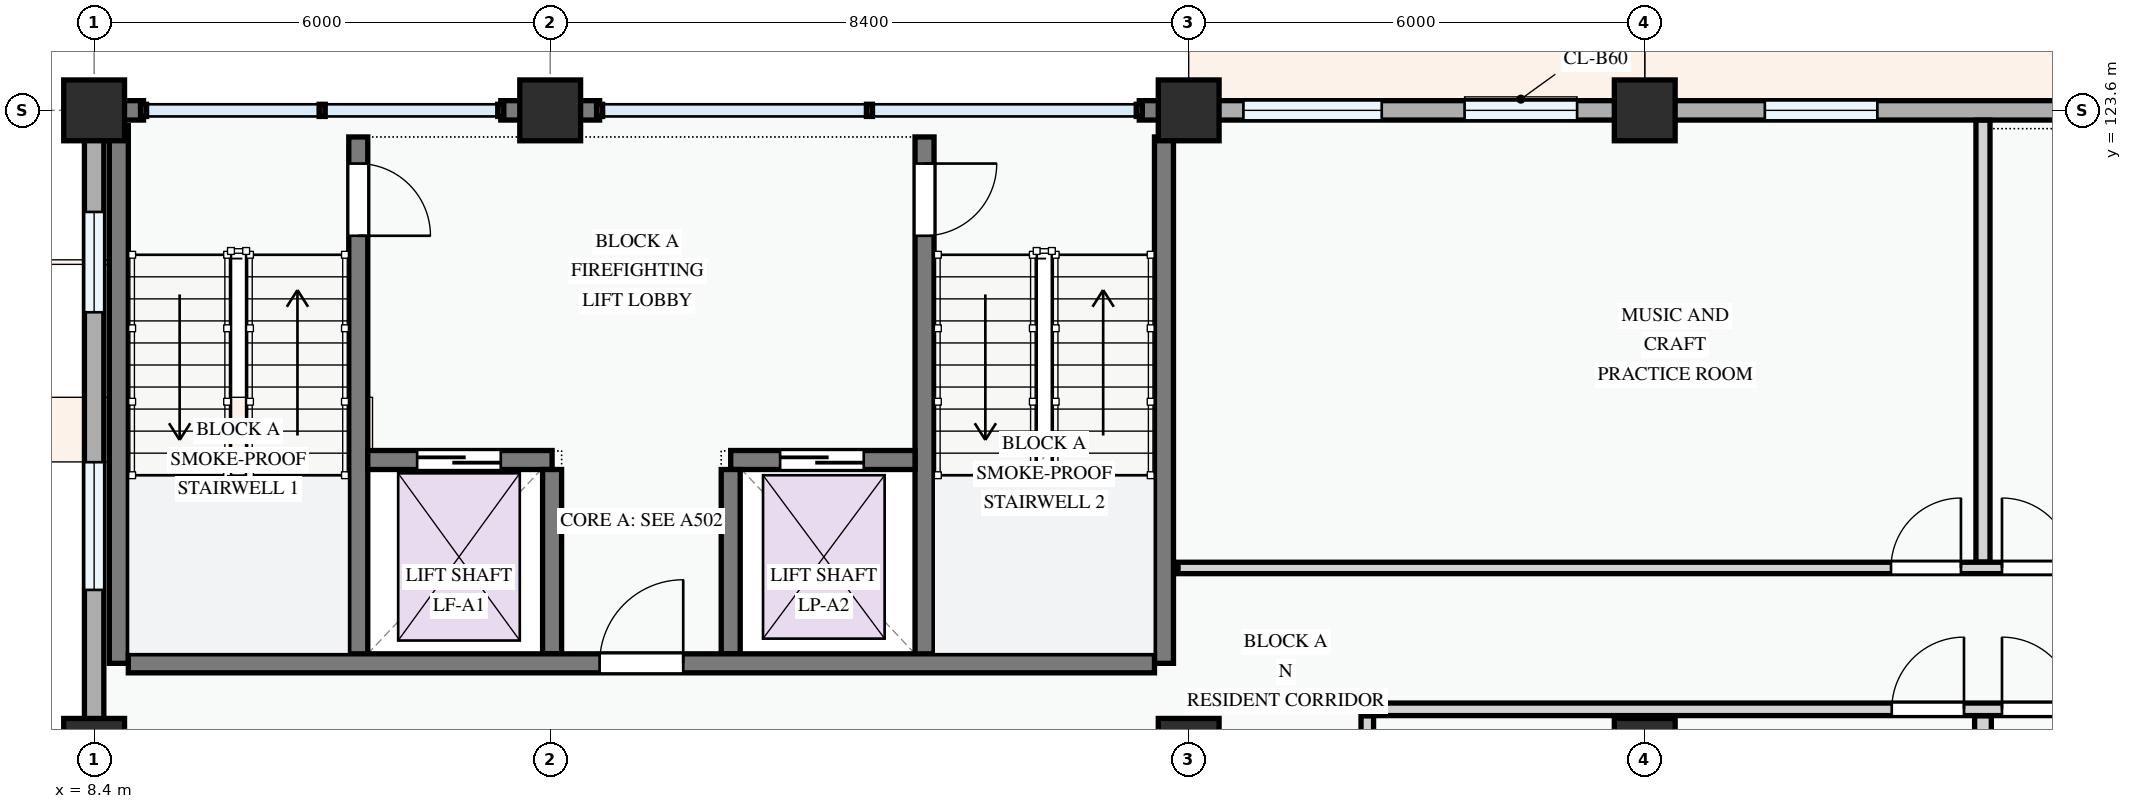
"""IFC4 building model, lengths in metres.
Left out: names, types, materials, properties, quantities, classifications, styles, units other than length and angle.
Written with IfcOpenShell. Run it as: python <this file> out.ifc"""

import sys

from ifc_helpers import new_model, si_unit, direction, frame, frame_2d, origin, origin_2d, place, context, subcontext, project, spatial, rectangle, extrude, element, fill, save


model = new_model("IFC4")
c1 = context("Model", 3, precision=1e-05, world=origin(), true_north=direction((0.0, 1.0)))
c2 = subcontext(c1, "Body", "Model", "MODEL_VIEW")
j1 = project(units=[si_unit("LENGTHUNIT", "METRE"), si_unit("PLANEANGLEUNIT", "RADIAN")], contexts=[c1])
p1 = place(None, origin())
s1 = spatial("IfcSite", under=j1, at=p1, CompositionType="ELEMENT")
p2 = place(p1, origin())
s2 = spatial("IfcBuilding", under=s1, at=p2, CompositionType="ELEMENT")
p3 = place(p2, frame((0.0, 0.0, 4.5)))
s3 = spatial("IfcBuildingStorey", under=s2, at=p3, CompositionType="ELEMENT", Elevation=4.5)
for number, where, z_axis, x_axis in (
    (1, (8.4, 115.2, 0.0), (0.0, 0.0, 1.0), (1.0, 0.0, 0.0)),
    (2, (8.4, 123.6, 0.0), (0.0, 0.0, 1.0), (1.0, 0.0, 0.0)),
    (3, (14.4, 123.6, 0.0), (0.0, 0.0, 1.0), (1.0, 0.0, 0.0)),
    (4, (22.8, 115.2, 0.0), (0.0, 0.0, 1.0), (1.0, 0.0, 0.0)),
    (5, (22.8, 123.6, 0.0), (0.0, 0.0, 1.0), (1.0, 0.0, 0.0)),
    (6, (28.8, 115.2, 0.0), (0.0, 0.0, 1.0), (1.0, 0.0, 0.0)),
    (7, (28.8, 123.6, 0.0), (0.0, 0.0, 1.0), (1.0, 0.0, 0.0)),
):
    element("IfcColumn", number, at=place(p3, frame(where, z_axis=z_axis, x_axis=x_axis)), inside=s3, PredefinedType="COLUMN", context=c2, shape_type="SweptSolid", body=[
        extrude(rectangle(XDim=0.8, YDim=0.8, at=origin_2d()), origin(), (0.0, 0.0, 1.0), 3.6),
    ])
p4 = place(p3, frame((37.2, 123.6, 0.0), z_axis=(0.0, 0.0, 1.0), x_axis=(-1.0, 0.0, 0.0)))
e8 = element("IfcWall", 8, at=p4, inside=s3, PredefinedType="STANDARD", context=c2, shape_type="SweptSolid", body=[
    extrude(rectangle(XDim=8.4, YDim=0.255, at=frame_2d((4.2, 0.0))), origin(), (0.0, 0.0, 1.0), 2.675),
])
p5 = place(p4, frame((1.445, 0.0, 0.78)))
e9 = element("IfcOpeningElement", 9, at=p5, cuts=e8, PredefinedType="OPENING", context=c2, shape_type="SweptSolid", body=[
    extrude(rectangle(XDim=1.25, YDim=1.3, at=frame_2d((0.625, 0.65))), frame((0.0, 0.137, 0.0), z_axis=(0.0, -1.0, 0.0), x_axis=(1.0, 0.0, 0.0)), (0.0, 0.0, 1.0), 0.275),
])
p6 = place(p4, frame((5.34, 0.0, 0.78)))
e10 = element("IfcOpeningElement", 10, at=p6, cuts=e8, PredefinedType="OPENING", context=c2, shape_type="SweptSolid", body=[
    extrude(rectangle(XDim=1.48, YDim=1.52, at=frame_2d((0.74, 0.76))), frame((0.0, 0.137, 0.0), z_axis=(0.0, -1.0, 0.0), x_axis=(1.0, 0.0, 0.0)), (0.0, 0.0, 1.0), 0.275),
])
p7 = place(p3, frame((28.8, 123.6, 0.0), z_axis=(0.0, 0.0, 1.0), x_axis=(-1.0, 0.0, 0.0)))
e11 = element("IfcWall", 11, at=p7, inside=s3, PredefinedType="STANDARD", context=c2, shape_type="SweptSolid", body=[
    extrude(rectangle(XDim=6.0, YDim=0.255, at=frame_2d((3.0, 0.0))), origin(), (0.0, 0.0, 1.0), 2.775),
])
p8 = place(p7, frame((0.89, 0.0, 0.78)))
e12 = element("IfcOpeningElement", 12, at=p8, cuts=e11, PredefinedType="OPENING", context=c2, shape_type="SweptSolid", body=[
    extrude(rectangle(XDim=1.48, YDim=1.52, at=frame_2d((0.74, 0.76))), frame((0.0, 0.137, 0.0), z_axis=(0.0, -1.0, 0.0), x_axis=(1.0, 0.0, 0.0)), (0.0, 0.0, 1.0), 0.275),
])
p9 = place(p7, frame((3.46, 0.0, 0.78)))
e13 = element("IfcOpeningElement", 13, at=p9, cuts=e11, PredefinedType="OPENING", context=c2, shape_type="SweptSolid", body=[
    extrude(rectangle(XDim=1.82, YDim=1.46, at=frame_2d((0.91, 0.73))), frame((0.0, 0.137, 0.0), z_axis=(0.0, -1.0, 0.0), x_axis=(1.0, 0.0, 0.0)), (0.0, 0.0, 1.0), 0.275),
])
for number, where, z_axis, x_axis in (
    (14, (22.8, 123.6, 0.0), (0.0, 0.0, 1.0), (-1.0, 0.0, 0.0)),
    (15, (15.05, 123.6, 0.0), (0.0, 0.0, 1.0), (-1.0, 0.0, 0.0)),
):
    element("IfcWall", number, at=place(p3, frame(where, z_axis=z_axis, x_axis=x_axis)), inside=s3, PredefinedType="STANDARD", context=c2, shape_type="SweptSolid", body=[
        extrude(rectangle(XDim=0.65, YDim=0.255, at=frame_2d((0.325, 0.0))), origin(), (0.0, 0.0, 1.0), 3.34),
    ])
p10 = place(p3, frame((14.4, 123.6, 0.0), z_axis=(0.0, 0.0, 1.0), x_axis=(-1.0, 0.0, 0.0)))
e16 = element("IfcWall", 16, at=p10, inside=s3, PredefinedType="STANDARD", context=c2, shape_type="SweptSolid", body=[
    extrude(rectangle(XDim=0.65, YDim=0.255, at=frame_2d((0.325, 0.0))), origin(), (0.0, 0.0, 1.0), 3.34),
])
p11 = place(p3, frame((9.05, 123.6, 0.0), z_axis=(0.0, 0.0, 1.0), x_axis=(-1.0, 0.0, 0.0)))
e17 = element("IfcWall", 17, at=p11, inside=s3, PredefinedType="STANDARD", context=c2, shape_type="SweptSolid", body=[
    extrude(rectangle(XDim=0.521, YDim=0.255, at=frame_2d((0.26, 0.0))), origin(), (0.0, 0.0, 1.0), 3.34),
])
p12 = place(p3, frame((8.4, 123.6, 0.0), z_axis=(0.0, 0.0, 1.0), x_axis=(0.0, -1.0, 0.0)))
e18 = element("IfcWall", 18, at=p12, inside=s3, PredefinedType="STANDARD", context=c2, shape_type="SweptSolid", body=[
    extrude(rectangle(XDim=8.4, YDim=0.255, at=frame_2d((4.2, 0.0))), origin(), (0.0, 0.0, 1.0), 2.725),
])
p13 = place(p12, frame((1.336, 0.0, 0.78)))
e19 = element("IfcOpeningElement", 19, at=p13, cuts=e18, PredefinedType="OPENING", context=c2, shape_type="SweptSolid", body=[
    extrude(rectangle(XDim=1.32, YDim=1.35, at=frame_2d((0.66, 0.675))), frame((0.0, 0.137, 0.0), z_axis=(0.0, -1.0, 0.0), x_axis=(1.0, 0.0, 0.0)), (0.0, 0.0, 1.0), 0.275),
])
p14 = place(p12, frame((4.629, 0.0, 0.78)))
e20 = element("IfcOpeningElement", 20, at=p14, cuts=e18, PredefinedType="OPENING", context=c2, shape_type="SweptSolid", body=[
    extrude(rectangle(XDim=1.68, YDim=1.46, at=frame_2d((0.84, 0.73))), frame((0.0, 0.137, 0.0), z_axis=(0.0, -1.0, 0.0), x_axis=(1.0, 0.0, 0.0)), (0.0, 0.0, 1.0), 0.275),
])
p15 = place(p3, frame((11.875, 123.25, 0.0), z_axis=(0.0, 0.0, 1.0), x_axis=(0.0, -1.0, 0.0)))
e21 = element("IfcWall", 21, at=p15, inside=s3, PredefinedType="SHEAR", context=c2, shape_type="SweptSolid", body=[
    extrude(rectangle(XDim=6.925, YDim=0.25, at=frame_2d((3.462, 0.0))), origin(), (0.0, 0.0, 1.0), 3.3),
])
p16 = place(p15, frame((0.35, 0.0, 0.0)))
e22 = element("IfcOpeningElement", 22, at=p16, cuts=e21, PredefinedType="OPENING", context=c2, shape_type="SweptSolid", body=[
    extrude(rectangle(XDim=0.95, YDim=2.1, at=frame_2d((0.475, 1.05))), frame((0.0, 0.135, 0.0), z_axis=(0.0, -1.0, 0.0), x_axis=(1.0, 0.0, 0.0)), (0.0, 0.0, 1.0), 0.27),
])
p17 = place(p3, frame((8.725, 123.4, 0.0), z_axis=(0.0, 0.0, 1.0), x_axis=(0.0, -1.0, 0.0)))
e23 = element("IfcWall", 23, at=p17, inside=s3, PredefinedType="SHEAR", context=c2, shape_type="SweptSolid", body=[
    extrude(rectangle(XDim=7.075, YDim=0.25, at=frame_2d((3.538, 0.0))), origin(), (0.0, 0.0, 1.0), 3.3),
])
p18 = place(p3, frame((22.475, 123.25, 0.0), z_axis=(0.0, 0.0, 1.0), x_axis=(0.0, -1.0, 0.0)))
e24 = element("IfcWall", 24, at=p18, inside=s3, PredefinedType="SHEAR", context=c2, shape_type="SweptSolid", body=[
    extrude(rectangle(XDim=6.925, YDim=0.25, at=frame_2d((3.462, 0.0))), origin(), (0.0, 0.0, 1.0), 3.3),
])
p19 = place(p3, frame((19.325, 123.25, 0.0), z_axis=(0.0, 0.0, 1.0), x_axis=(0.0, -1.0, 0.0)))
e25 = element("IfcWall", 25, at=p19, inside=s3, PredefinedType="SHEAR", context=c2, shape_type="SweptSolid", body=[
    extrude(rectangle(XDim=6.925, YDim=0.25, at=frame_2d((3.462, 0.0))), origin(), (0.0, 0.0, 1.0), 3.3),
])
p20 = place(p19, frame((0.35, 0.0, 0.0)))
e26 = element("IfcOpeningElement", 26, at=p20, cuts=e25, PredefinedType="OPENING", context=c2, shape_type="SweptSolid", body=[
    extrude(rectangle(XDim=0.95, YDim=2.1, at=frame_2d((0.475, 1.05))), frame((0.0, 0.135, 0.0), z_axis=(0.0, -1.0, 0.0), x_axis=(1.0, 0.0, 0.0)), (0.0, 0.0, 1.0), 0.27),
])
p21 = place(p3, frame((12.0, 119.0, 0.0), z_axis=(0.0, 0.0, 1.0), x_axis=(1.0, 0.0, 0.0)))
e27 = element("IfcWall", 27, at=p21, inside=s3, PredefinedType="SHEAR", context=c2, shape_type="SweptSolid", body=[
    extrude(rectangle(XDim=2.425, YDim=0.25, at=frame_2d((1.212, 0.0))), origin(), (0.0, 0.0, 1.0), 3.3),
])
p22 = place(p21, frame((0.65, 0.0, 0.0)))
e28 = element("IfcOpeningElement", 28, at=p22, cuts=e27, PredefinedType="OPENING", context=c2, shape_type="SweptSolid", body=[
    extrude(rectangle(XDim=1.1, YDim=2.15, at=frame_2d((0.55, 1.075))), frame((0.0, 0.135, 0.0), z_axis=(0.0, -1.0, 0.0), x_axis=(1.0, 0.0, 0.0)), (0.0, 0.0, 1.0), 0.27),
])
p23 = place(p3, frame((16.775, 119.0, 0.0), z_axis=(0.0, 0.0, 1.0), x_axis=(1.0, 0.0, 0.0)))
e29 = element("IfcWall", 29, at=p23, inside=s3, PredefinedType="SHEAR", context=c2, shape_type="SweptSolid", body=[
    extrude(rectangle(XDim=2.425, YDim=0.25, at=frame_2d((1.212, 0.0))), origin(), (0.0, 0.0, 1.0), 3.3),
])
p24 = place(p23, frame((0.65, 0.0, 0.0)))
e30 = element("IfcOpeningElement", 30, at=p24, cuts=e29, PredefinedType="OPENING", context=c2, shape_type="SweptSolid", body=[
    extrude(rectangle(XDim=1.1, YDim=2.15, at=frame_2d((0.55, 1.075))), frame((0.0, 0.135, 0.0), z_axis=(0.0, -1.0, 0.0), x_axis=(1.0, 0.0, 0.0)), (0.0, 0.0, 1.0), 0.27),
])
for number, where, z_axis, x_axis in (
    (31, (14.425, 118.875, 0.0), (0.0, 0.0, 1.0), (0.0, -1.0, 0.0)),
    (32, (16.775, 118.875, 0.0), (0.0, 0.0, 1.0), (0.0, -1.0, 0.0)),
):
    element("IfcWall", number, at=place(p3, frame(where, z_axis=z_axis, x_axis=x_axis)), inside=s3, PredefinedType="SHEAR", context=c2, shape_type="SweptSolid", body=[
        extrude(rectangle(XDim=2.425, YDim=0.25, at=frame_2d((1.212, 0.0))), origin(), (0.0, 0.0, 1.0), 3.3),
    ])
p25 = place(p3, frame((8.85, 116.325, 0.0), z_axis=(0.0, 0.0, 1.0), x_axis=(1.0, 0.0, 0.0)))
e33 = element("IfcWall", 33, at=p25, inside=s3, PredefinedType="SHEAR", context=c2, shape_type="SweptSolid", body=[
    extrude(rectangle(XDim=13.5, YDim=0.25, at=frame_2d((6.75, 0.0))), origin(), (0.0, 0.0, 1.0), 3.3),
])
p26 = place(p25, frame((6.2, 0.0, 0.0)))
e34 = element("IfcOpeningElement", 34, at=p26, cuts=e33, PredefinedType="OPENING", context=c2, shape_type="SweptSolid", body=[
    extrude(rectangle(XDim=1.1, YDim=2.15, at=frame_2d((0.55, 1.075))), frame((0.0, 0.135, 0.0), z_axis=(0.0, -1.0, 0.0), x_axis=(1.0, 0.0, 0.0)), (0.0, 0.0, 1.0), 0.27),
])
p27 = place(p3, frame((25.15, 109.33, 0.0), z_axis=(0.0, 0.0, 1.0), x_axis=(0.0, 1.0, 0.0)))
e35 = element("IfcWall", 35, at=p27, inside=s3, PredefinedType="PARTITIONING", context=c2, shape_type="SweptSolid", body=[
    extrude(rectangle(XDim=6.306, YDim=0.165, at=frame_2d((3.153, 0.0))), origin(), (0.0, 0.0, 1.0), 3.3),
])
p28 = place(p3, frame((33.25, 109.26, 0.0), z_axis=(0.0, 0.0, 1.0), x_axis=(0.0, 1.0, 0.0)))
e36 = element("IfcWall", 36, at=p28, inside=s3, PredefinedType="PARTITIONING", context=c2, shape_type="SweptSolid", body=[
    extrude(rectangle(XDim=6.375, YDim=0.22, at=frame_2d((3.188, 0.0))), origin(), (0.0, 0.0, 1.0), 2.885),
])
p29 = place(p3, frame((33.25, 117.657, 0.0), z_axis=(0.0, 0.0, 1.0), x_axis=(0.0, 1.0, 0.0)))
e37 = element("IfcWall", 37, at=p29, inside=s3, PredefinedType="PARTITIONING", context=c2, shape_type="SweptSolid", body=[
    extrude(rectangle(XDim=5.813, YDim=0.185, at=frame_2d((2.907, 0.0))), origin(), (0.0, 0.0, 1.0), 2.885),
])
p30 = place(p3, frame((25.15, 115.72, 0.0), z_axis=(0.0, 0.0, 1.0), x_axis=(1.0, 0.0, 0.0)))
e38 = element("IfcWall", 38, at=p30, inside=s3, PredefinedType="PARTITIONING", context=c2, shape_type="SweptSolid", body=[
    extrude(rectangle(XDim=32.321, YDim=0.165, at=frame_2d((16.16, 0.0))), origin(), (0.0, 0.0, 1.0), 3.3),
])
p31 = place(p30, frame((6.9, 0.0, 0.0)))
e39 = element("IfcOpeningElement", 39, at=p31, cuts=e38, PredefinedType="OPENING", context=c2, shape_type="SweptSolid", body=[
    extrude(rectangle(XDim=0.95, YDim=2.1, at=frame_2d((0.475, 1.05))), frame((0.0, 0.093, 0.0), z_axis=(0.0, -1.0, 0.0), x_axis=(1.0, 0.0, 0.0)), (0.0, 0.0, 1.0), 0.185),
])
p32 = place(p30, frame((8.35, 0.0, 0.0)))
e40 = element("IfcOpeningElement", 40, at=p32, cuts=e38, PredefinedType="OPENING", context=c2, shape_type="SweptSolid", body=[
    extrude(rectangle(XDim=0.95, YDim=2.1, at=frame_2d((0.475, 1.05))), frame((0.0, 0.093, 0.0), z_axis=(0.0, -1.0, 0.0), x_axis=(1.0, 0.0, 0.0)), (0.0, 0.0, 1.0), 0.185),
])
p33 = place(p30, frame((21.718, 0.0, 0.0)))
e41 = element("IfcOpeningElement", 41, at=p33, cuts=e38, PredefinedType="OPENING", context=c2, shape_type="SweptSolid", body=[
    extrude(rectangle(XDim=0.95, YDim=2.1, at=frame_2d((0.475, 1.05))), frame((0.0, 0.093, 0.0), z_axis=(0.0, -1.0, 0.0), x_axis=(1.0, 0.0, 0.0)), (0.0, 0.0, 1.0), 0.185),
])
p34 = place(p30, frame((29.031, 0.0, 0.0)))
e42 = element("IfcOpeningElement", 42, at=p34, cuts=e38, PredefinedType="OPENING", context=c2, shape_type="SweptSolid", body=[
    extrude(rectangle(XDim=0.95, YDim=2.1, at=frame_2d((0.475, 1.05))), frame((0.0, 0.093, 0.0), z_axis=(0.0, -1.0, 0.0), x_axis=(1.0, 0.0, 0.0)), (0.0, 0.0, 1.0), 0.185),
])
p35 = place(p3, frame((22.66, 117.58, 0.0), z_axis=(0.0, 0.0, 1.0), x_axis=(1.0, 0.0, 0.0)))
e43 = element("IfcWall", 43, at=p35, inside=s3, PredefinedType="PARTITIONING", context=c2, shape_type="SweptSolid", body=[
    extrude(rectangle(XDim=34.88, YDim=0.15, at=frame_2d((17.44, 0.0))), origin(), (0.0, 0.0, 1.0), 3.3),
])
p36 = place(p35, frame((9.38, 0.0, 0.0)))
e44 = element("IfcOpeningElement", 44, at=p36, cuts=e43, PredefinedType="OPENING", context=c2, shape_type="SweptSolid", body=[
    extrude(rectangle(XDim=0.92, YDim=2.1, at=frame_2d((0.46, 1.05))), frame((0.0, 0.085, 0.0), z_axis=(0.0, -1.0, 0.0), x_axis=(1.0, 0.0, 0.0)), (0.0, 0.0, 1.0), 0.17),
])
p37 = place(p35, frame((10.84, 0.0, 0.0)))
e45 = element("IfcOpeningElement", 45, at=p37, cuts=e43, PredefinedType="OPENING", context=c2, shape_type="SweptSolid", body=[
    extrude(rectangle(XDim=0.92, YDim=2.1, at=frame_2d((0.46, 1.05))), frame((0.0, 0.085, 0.0), z_axis=(0.0, -1.0, 0.0), x_axis=(1.0, 0.0, 0.0)), (0.0, 0.0, 1.0), 0.17),
])
p38 = place(p35, frame((24.2, 0.0, 0.0)))
e46 = element("IfcOpeningElement", 46, at=p38, cuts=e43, PredefinedType="OPENING", context=c2, shape_type="SweptSolid", body=[
    extrude(rectangle(XDim=0.92, YDim=2.1, at=frame_2d((0.46, 1.05))), frame((0.0, 0.085, 0.0), z_axis=(0.0, -1.0, 0.0), x_axis=(1.0, 0.0, 0.0)), (0.0, 0.0, 1.0), 0.17),
])
p39 = place(p35, frame((31.515, 0.0, 0.0)))
e47 = element("IfcOpeningElement", 47, at=p39, cuts=e43, PredefinedType="OPENING", context=c2, shape_type="SweptSolid", body=[
    extrude(rectangle(XDim=0.92, YDim=2.1, at=frame_2d((0.46, 1.05))), frame((0.0, 0.085, 0.0), z_axis=(0.0, -1.0, 0.0), x_axis=(1.0, 0.0, 0.0)), (0.0, 0.0, 1.0), 0.17),
])
p40 = place(p6, origin())
e48 = element("IfcWindow", 48, at=p40, inside=s3, PartitioningType="SINGLE_PANEL", PredefinedType="WINDOW", context=c2, shape_type="SweptSolid", body=[
    extrude(rectangle(XDim=1.48, YDim=1.52, at=frame_2d((0.74, 0.76))), frame((0.0, 0.03, 0.0), z_axis=(0.0, -1.0, 0.0), x_axis=(1.0, 0.0, 0.0)), (0.0, 0.0, 1.0), 0.06),
])
fill(e10, e48)
p41 = place(p8, origin())
e49 = element("IfcWindow", 49, at=p41, inside=s3, PartitioningType="SINGLE_PANEL", PredefinedType="WINDOW", context=c2, shape_type="SweptSolid", body=[
    extrude(rectangle(XDim=1.48, YDim=1.52, at=frame_2d((0.74, 0.76))), frame((0.0, 0.03, 0.0), z_axis=(0.0, -1.0, 0.0), x_axis=(1.0, 0.0, 0.0)), (0.0, 0.0, 1.0), 0.06),
])
fill(e12, e49)
p42 = place(p9, origin())
e50 = element("IfcWindow", 50, at=p42, inside=s3, PartitioningType="DOUBLE_PANEL_VERTICAL", PredefinedType="WINDOW", context=c2, shape_type="SweptSolid", body=[
    extrude(rectangle(XDim=1.82, YDim=1.46, at=frame_2d((0.91, 0.73))), frame((0.0, 0.03, 0.0), z_axis=(0.0, -1.0, 0.0), x_axis=(1.0, 0.0, 0.0)), (0.0, 0.0, 1.0), 0.06),
])
fill(e13, e50)
p43 = place(p13, origin())
e51 = element("IfcWindow", 51, at=p43, inside=s3, PartitioningType="SINGLE_PANEL", PredefinedType="WINDOW", context=c2, shape_type="SweptSolid", body=[
    extrude(rectangle(XDim=1.32, YDim=1.35, at=frame_2d((0.66, 0.675))), frame((0.0, 0.03, 0.0), z_axis=(0.0, -1.0, 0.0), x_axis=(1.0, 0.0, 0.0)), (0.0, 0.0, 1.0), 0.06),
])
fill(e19, e51)
p44 = place(p14, origin())
e52 = element("IfcWindow", 52, at=p44, inside=s3, PartitioningType="DOUBLE_PANEL_VERTICAL", PredefinedType="WINDOW", context=c2, shape_type="SweptSolid", body=[
    extrude(rectangle(XDim=1.68, YDim=1.46, at=frame_2d((0.84, 0.73))), frame((0.0, 0.03, 0.0), z_axis=(0.0, -1.0, 0.0), x_axis=(1.0, 0.0, 0.0)), (0.0, 0.0, 1.0), 0.06),
])
fill(e20, e52)
p45 = place(p16, origin())
e53 = element("IfcDoor", 53, at=p45, inside=s3, OperationType="SINGLE_SWING_RIGHT", PredefinedType="DOOR", context=c2, shape_type="SweptSolid", body=[
    extrude(rectangle(XDim=0.95, YDim=2.1, at=frame_2d((0.475, 1.05))), frame((0.0, 0.025, 0.0), z_axis=(0.0, -1.0, 0.0), x_axis=(1.0, 0.0, 0.0)), (0.0, 0.0, 1.0), 0.05),
])
fill(e22, e53)
p46 = place(p20, origin())
e54 = element("IfcDoor", 54, at=p46, inside=s3, OperationType="SINGLE_SWING_LEFT", PredefinedType="DOOR", context=c2, shape_type="SweptSolid", body=[
    extrude(rectangle(XDim=0.95, YDim=2.1, at=frame_2d((0.475, 1.05))), frame((0.0, 0.025, 0.0), z_axis=(0.0, -1.0, 0.0), x_axis=(1.0, 0.0, 0.0)), (0.0, 0.0, 1.0), 0.05),
])
fill(e26, e54)
p47 = place(p22, origin())
e55 = element("IfcDoor", 55, at=p47, inside=s3, OperationType="SLIDING_TO_LEFT", PredefinedType="DOOR", context=c2, shape_type="SweptSolid", body=[
    extrude(rectangle(XDim=1.1, YDim=2.15, at=frame_2d((0.55, 1.075))), frame((0.0, 0.025, 0.0), z_axis=(0.0, -1.0, 0.0), x_axis=(1.0, 0.0, 0.0)), (0.0, 0.0, 1.0), 0.05),
])
fill(e28, e55)
p48 = place(p24, origin())
e56 = element("IfcDoor", 56, at=p48, inside=s3, OperationType="SLIDING_TO_LEFT", PredefinedType="DOOR", context=c2, shape_type="SweptSolid", body=[
    extrude(rectangle(XDim=1.1, YDim=2.15, at=frame_2d((0.55, 1.075))), frame((0.0, 0.025, 0.0), z_axis=(0.0, -1.0, 0.0), x_axis=(1.0, 0.0, 0.0)), (0.0, 0.0, 1.0), 0.05),
])
fill(e30, e56)
p49 = place(p26, origin())
e57 = element("IfcDoor", 57, at=p49, inside=s3, OperationType="SINGLE_SWING_RIGHT", PredefinedType="DOOR", context=c2, shape_type="SweptSolid", body=[
    extrude(rectangle(XDim=1.1, YDim=2.15, at=frame_2d((0.55, 1.075))), frame((0.0, 0.025, 0.0), z_axis=(0.0, -1.0, 0.0), x_axis=(1.0, 0.0, 0.0)), (0.0, 0.0, 1.0), 0.05),
])
fill(e34, e57)
p50 = place(p31, origin())
e58 = element("IfcDoor", 58, at=p50, inside=s3, OperationType="SINGLE_SWING_RIGHT", PredefinedType="DOOR", context=c2, shape_type="SweptSolid", body=[
    extrude(rectangle(XDim=0.95, YDim=2.1, at=frame_2d((0.475, 1.05))), frame((0.0, 0.025, 0.0), z_axis=(0.0, -1.0, 0.0), x_axis=(1.0, 0.0, 0.0)), (0.0, 0.0, 1.0), 0.05),
])
fill(e39, e58)
p51 = place(p32, origin())
e59 = element("IfcDoor", 59, at=p51, inside=s3, OperationType="SINGLE_SWING_LEFT", PredefinedType="DOOR", context=c2, shape_type="SweptSolid", body=[
    extrude(rectangle(XDim=0.95, YDim=2.1, at=frame_2d((0.475, 1.05))), frame((0.0, 0.025, 0.0), z_axis=(0.0, -1.0, 0.0), x_axis=(1.0, 0.0, 0.0)), (0.0, 0.0, 1.0), 0.05),
])
fill(e40, e59)
p52 = place(p36, origin())
e60 = element("IfcDoor", 60, at=p52, inside=s3, OperationType="SINGLE_SWING_RIGHT", PredefinedType="DOOR", context=c2, shape_type="SweptSolid", body=[
    extrude(rectangle(XDim=0.92, YDim=2.1, at=frame_2d((0.46, 1.05))), frame((0.0, 0.025, 0.0), z_axis=(0.0, -1.0, 0.0), x_axis=(1.0, 0.0, 0.0)), (0.0, 0.0, 1.0), 0.05),
])
fill(e44, e60)
p53 = place(p37, origin())
e61 = element("IfcDoor", 61, at=p53, inside=s3, OperationType="SINGLE_SWING_LEFT", PredefinedType="DOOR", context=c2, shape_type="SweptSolid", body=[
    extrude(rectangle(XDim=0.92, YDim=2.1, at=frame_2d((0.46, 1.05))), frame((0.0, 0.025, 0.0), z_axis=(0.0, -1.0, 0.0), x_axis=(1.0, 0.0, 0.0)), (0.0, 0.0, 1.0), 0.05),
])
fill(e45, e61)
save(model, sys.argv[1])
